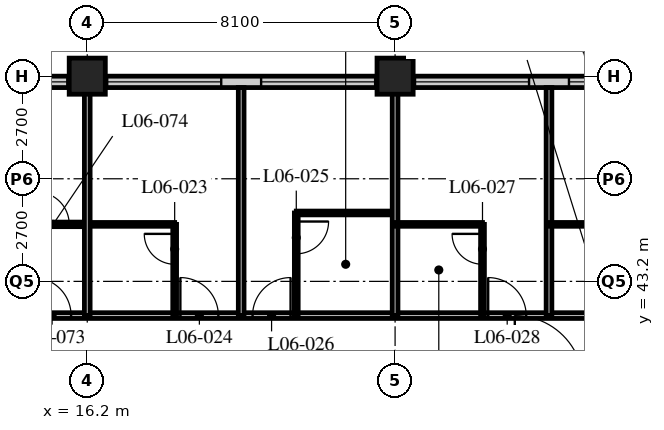
"""IFC4 building model, lengths in metres.
Left out: names, types, materials, properties, quantities, classifications, styles, units other than length and angle.
Written with IfcOpenShell. Run it as: python <this file> out.ifc"""

import sys

from ifc_helpers import new_model, si_unit, direction, frame, frame_2d, origin, origin_2d, place, context, subcontext, project, spatial, rectangle, hollow_rectangle, extrude, element, fill, save


model = new_model("IFC4")
c1 = context("Model", 3, precision=1e-05, world=origin(), true_north=direction((0.0, 1.0)))
c2 = subcontext(c1, "Body", "Model", "MODEL_VIEW")
j1 = project(units=[si_unit("LENGTHUNIT", "METRE"), si_unit("PLANEANGLEUNIT", "RADIAN")], contexts=[c1])
p1 = place(None, origin())
s1 = spatial("IfcSite", under=j1, at=p1, CompositionType="ELEMENT")
p2 = place(p1, origin())
s2 = spatial("IfcBuilding", under=s1, at=p2, CompositionType="ELEMENT")
p3 = place(p2, frame((0.0, 0.0, 33.0)))
s3 = spatial("IfcBuildingStorey", under=s2, at=p3, CompositionType="ELEMENT", Elevation=33.0)
for number, where, z_axis, x_axis in (
    (1, (16.2, 48.6, 0.0), (0.0, 0.0, 1.0), (1.0, 0.0, 0.0)),
    (2, (24.3, 48.6, 0.0), (0.0, 0.0, 1.0), (1.0, 0.0, 0.0)),
):
    element("IfcColumn", number, at=place(p3, frame(where, z_axis=z_axis, x_axis=x_axis)), inside=s3, PredefinedType="COLUMN", context=c2, shape_type="SweptSolid", body=[
        extrude(hollow_rectangle(XDim=0.95, YDim=0.95, WallThickness=0.095, at=origin_2d()), origin(), (0.0, 0.0, 1.0), 3.4),
    ])
p4 = place(p3, frame((48.3, 48.45, 0.0), z_axis=(0.0, 0.0, 1.0), x_axis=(-1.0, 0.0, 0.0)))
e3 = element("IfcWall", 3, at=p4, inside=s3, PredefinedType="SOLIDWALL", context=c2, shape_type="SweptSolid", body=[
    extrude(rectangle(XDim=40.2, YDim=0.3, at=frame_2d((20.1, 0.0))), origin(), (0.0, 0.0, 1.0), 3.19),
])
p5 = place(p4, frame((0.225, 0.0, 0.9)))
e4 = element("IfcOpeningElement", 4, at=p5, cuts=e3, PredefinedType="OPENING", context=c2, shape_type="SweptSolid", body=[
    extrude(rectangle(XDim=3.0, YDim=2.0, at=frame_2d((1.5, 1.0))), frame((0.0, 0.16, 0.0), z_axis=(0.0, -1.0, 0.0), x_axis=(1.0, 0.0, 0.0)), (0.0, 0.0, 1.0), 0.32),
])
p6 = place(p4, frame((4.275, 0.0, 0.9)))
e5 = element("IfcOpeningElement", 5, at=p6, cuts=e3, PredefinedType="OPENING", context=c2, shape_type="SweptSolid", body=[
    extrude(rectangle(XDim=3.0, YDim=2.0, at=frame_2d((1.5, 1.0))), frame((0.0, 0.16, 0.0), z_axis=(0.0, -1.0, 0.0), x_axis=(1.0, 0.0, 0.0)), (0.0, 0.0, 1.0), 0.32),
])
p7 = place(p4, frame((8.325, 0.0, 0.9)))
e6 = element("IfcOpeningElement", 6, at=p7, cuts=e3, PredefinedType="OPENING", context=c2, shape_type="SweptSolid", body=[
    extrude(rectangle(XDim=3.0, YDim=2.0, at=frame_2d((1.5, 1.0))), frame((0.0, 0.16, 0.0), z_axis=(0.0, -1.0, 0.0), x_axis=(1.0, 0.0, 0.0)), (0.0, 0.0, 1.0), 0.32),
])
p8 = place(p4, frame((12.375, 0.0, 0.9)))
e7 = element("IfcOpeningElement", 7, at=p8, cuts=e3, PredefinedType="OPENING", context=c2, shape_type="SweptSolid", body=[
    extrude(rectangle(XDim=3.0, YDim=2.0, at=frame_2d((1.5, 1.0))), frame((0.0, 0.16, 0.0), z_axis=(0.0, -1.0, 0.0), x_axis=(1.0, 0.0, 0.0)), (0.0, 0.0, 1.0), 0.32),
])
p9 = place(p4, frame((16.425, 0.0, 0.9)))
e8 = element("IfcOpeningElement", 8, at=p9, cuts=e3, PredefinedType="OPENING", context=c2, shape_type="SweptSolid", body=[
    extrude(rectangle(XDim=3.0, YDim=2.0, at=frame_2d((1.5, 1.0))), frame((0.0, 0.16, 0.0), z_axis=(0.0, -1.0, 0.0), x_axis=(1.0, 0.0, 0.0)), (0.0, 0.0, 1.0), 0.32),
])
p10 = place(p4, frame((20.475, 0.0, 0.9)))
e9 = element("IfcOpeningElement", 9, at=p10, cuts=e3, PredefinedType="OPENING", context=c2, shape_type="SweptSolid", body=[
    extrude(rectangle(XDim=3.0, YDim=2.0, at=frame_2d((1.5, 1.0))), frame((0.0, 0.16, 0.0), z_axis=(0.0, -1.0, 0.0), x_axis=(1.0, 0.0, 0.0)), (0.0, 0.0, 1.0), 0.32),
])
p11 = place(p4, frame((24.525, 0.0, 0.9)))
e10 = element("IfcOpeningElement", 10, at=p11, cuts=e3, PredefinedType="OPENING", context=c2, shape_type="SweptSolid", body=[
    extrude(rectangle(XDim=3.0, YDim=2.0, at=frame_2d((1.5, 1.0))), frame((0.0, 0.16, 0.0), z_axis=(0.0, -1.0, 0.0), x_axis=(1.0, 0.0, 0.0)), (0.0, 0.0, 1.0), 0.32),
])
p12 = place(p4, frame((28.575, 0.0, 0.9)))
e11 = element("IfcOpeningElement", 11, at=p12, cuts=e3, PredefinedType="OPENING", context=c2, shape_type="SweptSolid", body=[
    extrude(rectangle(XDim=3.0, YDim=2.0, at=frame_2d((1.5, 1.0))), frame((0.0, 0.16, 0.0), z_axis=(0.0, -1.0, 0.0), x_axis=(1.0, 0.0, 0.0)), (0.0, 0.0, 1.0), 0.32),
])
p13 = place(p4, frame((32.625, 0.0, 0.9)))
e12 = element("IfcOpeningElement", 12, at=p13, cuts=e3, PredefinedType="OPENING", context=c2, shape_type="SweptSolid", body=[
    extrude(rectangle(XDim=3.0, YDim=2.0, at=frame_2d((1.5, 1.0))), frame((0.0, 0.16, 0.0), z_axis=(0.0, -1.0, 0.0), x_axis=(1.0, 0.0, 0.0)), (0.0, 0.0, 1.0), 0.32),
])
p14 = place(p4, frame((36.675, 0.0, 0.9)))
e13 = element("IfcOpeningElement", 13, at=p14, cuts=e3, PredefinedType="OPENING", context=c2, shape_type="SweptSolid", body=[
    extrude(rectangle(XDim=3.0, YDim=2.0, at=frame_2d((1.5, 1.0))), frame((0.0, 0.16, 0.0), z_axis=(0.0, -1.0, 0.0), x_axis=(1.0, 0.0, 0.0)), (0.0, 0.0, 1.0), 0.32),
])
p15 = place(p3, frame((12.15, 42.3, 0.0), z_axis=(0.0, 0.0, 1.0), x_axis=(1.0, 0.0, 0.0)))
e14 = element("IfcWall", 14, at=p15, inside=s3, PredefinedType="PARTITIONING", context=c2, shape_type="SweptSolid", body=[
    extrude(rectangle(XDim=32.4, YDim=0.15, at=frame_2d((16.2, 0.0))), origin(), (0.0, 0.0, 1.0), 3.19),
])
p16 = place(p15, frame((6.5, 0.0, 0.0)))
e15 = element("IfcOpeningElement", 15, at=p16, cuts=e14, PredefinedType="OPENING", context=c2, shape_type="SweptSolid", body=[
    extrude(rectangle(XDim=1.0, YDim=2.1, at=frame_2d((0.5, 1.05))), frame((0.0, 0.085, 0.0), z_axis=(0.0, -1.0, 0.0), x_axis=(1.0, 0.0, 0.0)), (0.0, 0.0, 1.0), 0.17),
])
p17 = place(p15, frame((8.4, 0.0, 0.0)))
e16 = element("IfcOpeningElement", 16, at=p17, cuts=e14, PredefinedType="OPENING", context=c2, shape_type="SweptSolid", body=[
    extrude(rectangle(XDim=1.0, YDim=2.1, at=frame_2d((0.5, 1.05))), frame((0.0, 0.085, 0.0), z_axis=(0.0, -1.0, 0.0), x_axis=(1.0, 0.0, 0.0)), (0.0, 0.0, 1.0), 0.17),
])
p18 = place(p15, frame((14.6, 0.0, 0.0)))
e17 = element("IfcOpeningElement", 17, at=p18, cuts=e14, PredefinedType="OPENING", context=c2, shape_type="SweptSolid", body=[
    extrude(rectangle(XDim=1.0, YDim=2.1, at=frame_2d((0.5, 1.05))), frame((0.0, 0.085, 0.0), z_axis=(0.0, -1.0, 0.0), x_axis=(1.0, 0.0, 0.0)), (0.0, 0.0, 1.0), 0.17),
])
p19 = place(p15, frame((18.65, 0.0, 0.0)))
e18 = element("IfcOpeningElement", 18, at=p19, cuts=e14, PredefinedType="OPENING", context=c2, shape_type="SweptSolid", body=[
    extrude(rectangle(XDim=1.0, YDim=2.1, at=frame_2d((0.5, 1.05))), frame((0.0, 0.085, 0.0), z_axis=(0.0, -1.0, 0.0), x_axis=(1.0, 0.0, 0.0)), (0.0, 0.0, 1.0), 0.17),
])
p20 = place(p15, frame((23.0, 0.0, 0.0)))
e19 = element("IfcOpeningElement", 19, at=p20, cuts=e14, PredefinedType="OPENING", context=c2, shape_type="SweptSolid", body=[
    extrude(rectangle(XDim=1.0, YDim=2.1, at=frame_2d((0.5, 1.05))), frame((0.0, 0.085, 0.0), z_axis=(0.0, -1.0, 0.0), x_axis=(1.0, 0.0, 0.0)), (0.0, 0.0, 1.0), 0.17),
])
p21 = place(p15, frame((26.75, 0.0, 0.0)))
e20 = element("IfcOpeningElement", 20, at=p21, cuts=e14, PredefinedType="OPENING", context=c2, shape_type="SweptSolid", body=[
    extrude(rectangle(XDim=1.0, YDim=2.1, at=frame_2d((0.5, 1.05))), frame((0.0, 0.085, 0.0), z_axis=(0.0, -1.0, 0.0), x_axis=(1.0, 0.0, 0.0)), (0.0, 0.0, 1.0), 0.17),
])
p22 = place(p15, frame((28.775, 0.0, 0.0)))
e21 = element("IfcOpeningElement", 21, at=p22, cuts=e14, PredefinedType="OPENING", context=c2, shape_type="SweptSolid", body=[
    extrude(rectangle(XDim=1.0, YDim=2.1, at=frame_2d((0.5, 1.05))), frame((0.0, 0.085, 0.0), z_axis=(0.0, -1.0, 0.0), x_axis=(1.0, 0.0, 0.0)), (0.0, 0.0, 1.0), 0.17),
])
p23 = place(p15, frame((2.625, 0.0, 0.0)))
e22 = element("IfcOpeningElement", 22, at=p23, cuts=e14, PredefinedType="OPENING", context=c2, shape_type="SweptSolid", body=[
    extrude(rectangle(XDim=1.0, YDim=2.1, at=frame_2d((0.5, 1.05))), frame((0.0, 0.085, 0.0), z_axis=(0.0, -1.0, 0.0), x_axis=(1.0, 0.0, 0.0)), (0.0, 0.0, 1.0), 0.17),
])
p24 = place(p3, frame((16.2, 44.7, 0.0), z_axis=(0.0, 0.0, 1.0), x_axis=(1.0, 0.0, 0.0)))
e23 = element("IfcWall", 23, at=p24, inside=s3, PredefinedType="PARTITIONING", context=c2, shape_type="SweptSolid", body=[
    extrude(rectangle(XDim=2.3, YDim=0.1, at=frame_2d((1.15, 0.0))), origin(), (0.0, 0.0, 1.0), 3.19),
])
p25 = place(p3, frame((18.5, 42.3, 0.0), z_axis=(0.0, 0.0, 1.0), x_axis=(0.0, 1.0, 0.0)))
e24 = element("IfcWall", 24, at=p25, inside=s3, PredefinedType="PARTITIONING", context=c2, shape_type="SweptSolid", body=[
    extrude(rectangle(XDim=2.4, YDim=0.1, at=frame_2d((1.2, 0.0))), origin(), (0.0, 0.0, 1.0), 3.19),
])
p26 = place(p25, frame((1.35, 0.0, 0.0)))
e25 = element("IfcOpeningElement", 25, at=p26, cuts=e24, PredefinedType="OPENING", context=c2, shape_type="SweptSolid", body=[
    extrude(rectangle(XDim=0.8, YDim=2.1, at=frame_2d((0.4, 1.05))), frame((0.0, 0.06, 0.0), z_axis=(0.0, -1.0, 0.0), x_axis=(1.0, 0.0, 0.0)), (0.0, 0.0, 1.0), 0.12),
])
p27 = place(p3, frame((20.25, 42.3, 0.0), z_axis=(0.0, 0.0, 1.0), x_axis=(0.0, 1.0, 0.0)))
e26 = element("IfcWall", 26, at=p27, inside=s3, PredefinedType="PARTITIONING", context=c2, shape_type="SweptSolid", body=[
    extrude(rectangle(XDim=6.0, YDim=0.15, at=frame_2d((3.0, 0.0))), origin(), (0.0, 0.0, 1.0), 3.19),
])
p28 = place(p3, frame((21.7, 45.0, 0.0), z_axis=(0.0, 0.0, 1.0), x_axis=(1.0, 0.0, 0.0)))
e27 = element("IfcWall", 27, at=p28, inside=s3, PredefinedType="PARTITIONING", context=c2, shape_type="SweptSolid", body=[
    extrude(rectangle(XDim=2.6, YDim=0.1, at=frame_2d((1.3, 0.0))), origin(), (0.0, 0.0, 1.0), 3.19),
])
p29 = place(p3, frame((21.7, 42.3, 0.0), z_axis=(0.0, 0.0, 1.0), x_axis=(0.0, 1.0, 0.0)))
e28 = element("IfcWall", 28, at=p29, inside=s3, PredefinedType="PARTITIONING", context=c2, shape_type="SweptSolid", body=[
    extrude(rectangle(XDim=2.7, YDim=0.1, at=frame_2d((1.35, 0.0))), origin(), (0.0, 0.0, 1.0), 3.19),
])
p30 = place(p29, frame((1.625, 0.0, 0.0)))
e29 = element("IfcOpeningElement", 29, at=p30, cuts=e28, PredefinedType="OPENING", context=c2, shape_type="SweptSolid", body=[
    extrude(rectangle(XDim=0.85, YDim=2.1, at=frame_2d((0.425, 1.05))), frame((0.0, 0.06, 0.0), z_axis=(0.0, -1.0, 0.0), x_axis=(1.0, 0.0, 0.0)), (0.0, 0.0, 1.0), 0.12),
])
p31 = place(p3, frame((24.3, 42.3, 0.0), z_axis=(0.0, 0.0, 1.0), x_axis=(0.0, 1.0, 0.0)))
e30 = element("IfcWall", 30, at=p31, inside=s3, PredefinedType="PARTITIONING", context=c2, shape_type="SweptSolid", body=[
    extrude(rectangle(XDim=6.0, YDim=0.15, at=frame_2d((3.0, 0.0))), origin(), (0.0, 0.0, 1.0), 2.578),
])
p32 = place(p3, frame((24.3, 44.7, 0.0), z_axis=(0.0, 0.0, 1.0), x_axis=(1.0, 0.0, 0.0)))
e31 = element("IfcWall", 31, at=p32, inside=s3, PredefinedType="PARTITIONING", context=c2, shape_type="SweptSolid", body=[
    extrude(rectangle(XDim=2.3, YDim=0.1, at=frame_2d((1.15, 0.0))), origin(), (0.0, 0.0, 1.0), 3.19),
])
p33 = place(p3, frame((26.6, 42.3, 0.0), z_axis=(0.0, 0.0, 1.0), x_axis=(0.0, 1.0, 0.0)))
e32 = element("IfcWall", 32, at=p33, inside=s3, PredefinedType="PARTITIONING", context=c2, shape_type="SweptSolid", body=[
    extrude(rectangle(XDim=2.4, YDim=0.1, at=frame_2d((1.2, 0.0))), origin(), (0.0, 0.0, 1.0), 3.19),
])
p34 = place(p33, frame((1.35, 0.0, 0.0)))
e33 = element("IfcOpeningElement", 33, at=p34, cuts=e32, PredefinedType="OPENING", context=c2, shape_type="SweptSolid", body=[
    extrude(rectangle(XDim=0.8, YDim=2.1, at=frame_2d((0.4, 1.05))), frame((0.0, 0.06, 0.0), z_axis=(0.0, -1.0, 0.0), x_axis=(1.0, 0.0, 0.0)), (0.0, 0.0, 1.0), 0.12),
])
p35 = place(p3, frame((28.35, 42.3, 0.0), z_axis=(0.0, 0.0, 1.0), x_axis=(0.0, 1.0, 0.0)))
e34 = element("IfcWall", 34, at=p35, inside=s3, PredefinedType="PARTITIONING", context=c2, shape_type="SweptSolid", body=[
    extrude(rectangle(XDim=6.0, YDim=0.15, at=frame_2d((3.0, 0.0))), origin(), (0.0, 0.0, 1.0), 3.19),
])
p36 = place(p3, frame((28.35, 44.7, 0.0), z_axis=(0.0, 0.0, 1.0), x_axis=(1.0, 0.0, 0.0)))
e35 = element("IfcWall", 35, at=p36, inside=s3, PredefinedType="PARTITIONING", context=c2, shape_type="SweptSolid", body=[
    extrude(rectangle(XDim=2.3, YDim=0.1, at=frame_2d((1.15, 0.0))), origin(), (0.0, 0.0, 1.0), 3.19),
])
p37 = place(p3, frame((12.15, 44.7, 0.0), z_axis=(0.0, 0.0, 1.0), x_axis=(1.0, 0.0, 0.0)))
e36 = element("IfcWall", 36, at=p37, inside=s3, PredefinedType="PARTITIONING", context=c2, shape_type="SweptSolid", body=[
    extrude(rectangle(XDim=4.05, YDim=0.12, at=frame_2d((2.025, 0.0))), origin(), (0.0, 0.0, 1.0), 3.19),
])
p38 = place(p37, frame((2.725, 0.0, 0.0)))
e37 = element("IfcOpeningElement", 37, at=p38, cuts=e36, PredefinedType="OPENING", context=c2, shape_type="SweptSolid", body=[
    extrude(rectangle(XDim=0.85, YDim=2.1, at=frame_2d((0.425, 1.05))), frame((0.0, 0.07, 0.0), z_axis=(0.0, -1.0, 0.0), x_axis=(1.0, 0.0, 0.0)), (0.0, 0.0, 1.0), 0.14),
])
p39 = place(p3, frame((16.2, 42.3, 0.0), z_axis=(0.0, 0.0, 1.0), x_axis=(0.0, 1.0, 0.0)))
e38 = element("IfcWall", 38, at=p39, inside=s3, PredefinedType="PARTITIONING", context=c2, shape_type="SweptSolid", body=[
    extrude(rectangle(XDim=6.0, YDim=0.15, at=frame_2d((3.0, 0.0))), origin(), (0.0, 0.0, 1.0), 2.578),
])
p40 = place(p9, origin())
e39 = element("IfcWindow", 39, at=p40, inside=s3, PartitioningType="SINGLE_PANEL", PredefinedType="WINDOW", context=c2, shape_type="SweptSolid", body=[
    extrude(rectangle(XDim=3.0, YDim=2.0, at=frame_2d((1.5, 1.0))), frame((0.0, 0.03, 0.0), z_axis=(0.0, -1.0, 0.0), x_axis=(1.0, 0.0, 0.0)), (0.0, 0.0, 1.0), 0.06),
])
fill(e8, e39)
p41 = place(p10, origin())
e40 = element("IfcWindow", 40, at=p41, inside=s3, PartitioningType="SINGLE_PANEL", PredefinedType="WINDOW", context=c2, shape_type="SweptSolid", body=[
    extrude(rectangle(XDim=3.0, YDim=2.0, at=frame_2d((1.5, 1.0))), frame((0.0, 0.03, 0.0), z_axis=(0.0, -1.0, 0.0), x_axis=(1.0, 0.0, 0.0)), (0.0, 0.0, 1.0), 0.06),
])
fill(e9, e40)
p42 = place(p11, origin())
e41 = element("IfcWindow", 41, at=p42, inside=s3, PartitioningType="SINGLE_PANEL", PredefinedType="WINDOW", context=c2, shape_type="SweptSolid", body=[
    extrude(rectangle(XDim=3.0, YDim=2.0, at=frame_2d((1.5, 1.0))), frame((0.0, 0.03, 0.0), z_axis=(0.0, -1.0, 0.0), x_axis=(1.0, 0.0, 0.0)), (0.0, 0.0, 1.0), 0.06),
])
fill(e10, e41)
p43 = place(p12, origin())
e42 = element("IfcWindow", 42, at=p43, inside=s3, PartitioningType="SINGLE_PANEL", PredefinedType="WINDOW", context=c2, shape_type="SweptSolid", body=[
    extrude(rectangle(XDim=3.0, YDim=2.0, at=frame_2d((1.5, 1.0))), frame((0.0, 0.03, 0.0), z_axis=(0.0, -1.0, 0.0), x_axis=(1.0, 0.0, 0.0)), (0.0, 0.0, 1.0), 0.06),
])
fill(e11, e42)
p44 = place(p13, origin())
e43 = element("IfcWindow", 43, at=p44, inside=s3, PartitioningType="SINGLE_PANEL", PredefinedType="WINDOW", context=c2, shape_type="SweptSolid", body=[
    extrude(rectangle(XDim=3.0, YDim=2.0, at=frame_2d((1.5, 1.0))), frame((0.0, 0.03, 0.0), z_axis=(0.0, -1.0, 0.0), x_axis=(1.0, 0.0, 0.0)), (0.0, 0.0, 1.0), 0.06),
])
fill(e12, e43)
p45 = place(p26, origin())
e44 = element("IfcDoor", 44, at=p45, inside=s3, OperationType="SINGLE_SWING_RIGHT", PredefinedType="DOOR", context=c2, shape_type="SweptSolid", body=[
    extrude(rectangle(XDim=0.8, YDim=2.1, at=frame_2d((0.4, 1.05))), frame((0.0, 0.025, 0.0), z_axis=(0.0, -1.0, 0.0), x_axis=(1.0, 0.0, 0.0)), (0.0, 0.0, 1.0), 0.05),
])
fill(e25, e44)
p46 = place(p16, origin())
e45 = element("IfcDoor", 45, at=p46, inside=s3, OperationType="SINGLE_SWING_LEFT", PredefinedType="DOOR", context=c2, shape_type="SweptSolid", body=[
    extrude(rectangle(XDim=1.0, YDim=2.1, at=frame_2d((0.5, 1.05))), frame((0.0, 0.025, 0.0), z_axis=(0.0, -1.0, 0.0), x_axis=(1.0, 0.0, 0.0)), (0.0, 0.0, 1.0), 0.05),
])
fill(e15, e45)
p47 = place(p30, origin())
e46 = element("IfcDoor", 46, at=p47, inside=s3, OperationType="SINGLE_SWING_LEFT", PredefinedType="DOOR", context=c2, shape_type="SweptSolid", body=[
    extrude(rectangle(XDim=0.85, YDim=2.1, at=frame_2d((0.425, 1.05))), frame((0.0, 0.025, 0.0), z_axis=(0.0, -1.0, 0.0), x_axis=(1.0, 0.0, 0.0)), (0.0, 0.0, 1.0), 0.05),
])
fill(e29, e46)
p48 = place(p17, origin())
e47 = element("IfcDoor", 47, at=p48, inside=s3, OperationType="SINGLE_SWING_RIGHT", PredefinedType="DOOR", context=c2, shape_type="SweptSolid", body=[
    extrude(rectangle(XDim=1.0, YDim=2.1, at=frame_2d((0.5, 1.05))), frame((0.0, 0.025, 0.0), z_axis=(0.0, -1.0, 0.0), x_axis=(1.0, 0.0, 0.0)), (0.0, 0.0, 1.0), 0.05),
])
fill(e16, e47)
p49 = place(p34, origin())
e48 = element("IfcDoor", 48, at=p49, inside=s3, OperationType="SINGLE_SWING_RIGHT", PredefinedType="DOOR", context=c2, shape_type="SweptSolid", body=[
    extrude(rectangle(XDim=0.8, YDim=2.1, at=frame_2d((0.4, 1.05))), frame((0.0, 0.025, 0.0), z_axis=(0.0, -1.0, 0.0), x_axis=(1.0, 0.0, 0.0)), (0.0, 0.0, 1.0), 0.05),
])
fill(e33, e48)
p50 = place(p18, origin())
e49 = element("IfcDoor", 49, at=p50, inside=s3, OperationType="SINGLE_SWING_LEFT", PredefinedType="DOOR", context=c2, shape_type="SweptSolid", body=[
    extrude(rectangle(XDim=1.0, YDim=2.1, at=frame_2d((0.5, 1.05))), frame((0.0, 0.025, 0.0), z_axis=(0.0, -1.0, 0.0), x_axis=(1.0, 0.0, 0.0)), (0.0, 0.0, 1.0), 0.05),
])
fill(e17, e49)
p51 = place(p23, origin())
e50 = element("IfcDoor", 50, at=p51, inside=s3, OperationType="SINGLE_SWING_LEFT", PredefinedType="DOOR", context=c2, shape_type="SweptSolid", body=[
    extrude(rectangle(XDim=1.0, YDim=2.1, at=frame_2d((0.5, 1.05))), frame((0.0, 0.025, 0.0), z_axis=(0.0, -1.0, 0.0), x_axis=(1.0, 0.0, 0.0)), (0.0, 0.0, 1.0), 0.05),
])
fill(e22, e50)
p52 = place(p38, origin())
e51 = element("IfcDoor", 51, at=p52, inside=s3, OperationType="SINGLE_SWING_LEFT", PredefinedType="DOOR", context=c2, shape_type="SweptSolid", body=[
    extrude(rectangle(XDim=0.85, YDim=2.1, at=frame_2d((0.425, 1.05))), frame((0.0, 0.025, 0.0), z_axis=(0.0, -1.0, 0.0), x_axis=(1.0, 0.0, 0.0)), (0.0, 0.0, 1.0), 0.05),
])
fill(e37, e51)
save(model, sys.argv[1])
